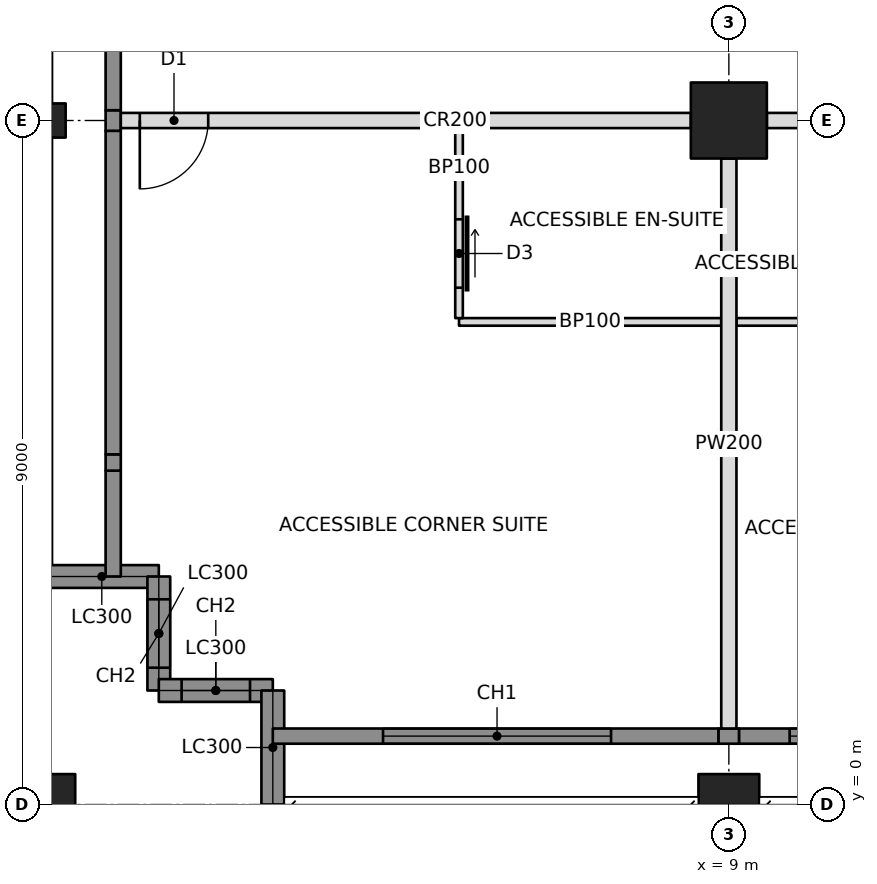
"""IFC4 building model, lengths in metres.
Left out: names, types, materials, properties, quantities, classifications, styles, units other than length and angle.
Written with IfcOpenShell. Run it as: python <this file> out.ifc"""

import sys

from ifc_helpers import new_model, si_unit, direction, frame, frame_2d, origin, origin_with_axes, origin_2d, place, context, subcontext, project, spatial, rectangle, hollow_rectangle, i_section, extrude, element, fill, save


model = new_model("IFC4")
c1 = context("Model", 3, precision=1e-05, world=origin(), true_north=direction((0.0, 1.0)))
c2 = subcontext(c1, "Body", "Model", "MODEL_VIEW")
j1 = project(units=[si_unit("LENGTHUNIT", "METRE"), si_unit("PLANEANGLEUNIT", "RADIAN")], contexts=[c1])
p1 = place(None, origin())
s1 = spatial("IfcSite", under=j1, at=p1, CompositionType="ELEMENT")
p2 = place(p1, origin())
s2 = spatial("IfcBuilding", under=s1, at=p2, CompositionType="ELEMENT")
p3 = place(p2, frame((0.0, 0.0, 97.6)))
s3 = spatial("IfcBuildingStorey", under=s2, at=p3, CompositionType="ELEMENT", Elevation=97.6)
p4 = place(p3, origin_with_axes())
e1 = element("IfcColumn", 1, at=p4, inside=s3, PredefinedType="COLUMN", context=c2, shape_type="SweptSolid", body=[
    extrude(hollow_rectangle(XDim=0.8, YDim=0.8, WallThickness=0.07, at=origin_2d()), origin(), (0.0, 0.0, 1.0), 3.4),
])
p5 = place(p3, frame((0.0, 9.0, 0.0), z_axis=(0.0, 0.0, 1.0), x_axis=(0.0, 1.0, 0.0)))
e2 = element("IfcColumn", 2, at=p5, inside=s3, PredefinedType="COLUMN", context=c2, shape_type="SweptSolid", body=[
    extrude(i_section(OverallWidth=0.449, OverallDepth=0.549, WebThickness=0.072, FlangeThickness=0.115, at=origin_2d()), origin(), (0.0, 0.0, 1.0), 3.4),
])
p6 = place(p3, frame((9.0, 0.0, 0.0), z_axis=(0.0, 0.0, 1.0), x_axis=(1.0, 0.0, 0.0)))
e3 = element("IfcColumn", 3, at=p6, inside=s3, PredefinedType="COLUMN", context=c2, shape_type="SweptSolid", body=[
    extrude(hollow_rectangle(XDim=0.8, YDim=0.8, WallThickness=0.07, at=origin_2d()), origin(), (0.0, 0.0, 1.0), 3.4),
])
p7 = place(p3, frame((9.0, 9.0, 0.0), z_axis=(0.0, 0.0, 1.0), x_axis=(1.0, 0.0, 0.0)))
e4 = element("IfcColumn", 4, at=p7, inside=s3, PredefinedType="COLUMN", context=c2, shape_type="SweptSolid", body=[
    extrude(hollow_rectangle(XDim=1.0, YDim=1.0, WallThickness=0.1, at=origin_2d()), origin(), (0.0, 0.0, 1.0), 3.4),
])
p8 = place(p3, frame((0.0, 3.0, 0.0), z_axis=(0.0, 0.0, 1.0), x_axis=(1.0, 0.0, 0.0)))
e5 = element("IfcWall", 5, at=p8, inside=s3, PredefinedType="SOLIDWALL", context=c2, shape_type="SweptSolid", body=[
    extrude(rectangle(XDim=1.5, YDim=0.3, at=frame_2d((0.75, 0.0))), origin(), (0.0, 0.0, 1.0), 2.42),
])
p9 = place(p3, frame((1.5, 3.0, 0.0), z_axis=(0.0, 0.0, 1.0), x_axis=(0.0, -1.0, 0.0)))
e6 = element("IfcWall", 6, at=p9, inside=s3, PredefinedType="SOLIDWALL", context=c2, shape_type="SweptSolid", body=[
    extrude(rectangle(XDim=1.5, YDim=0.3, at=frame_2d((0.75, 0.0))), origin(), (0.0, 0.0, 1.0), 3.2),
])
p10 = place(p9, frame((0.3, 0.0, 0.6)))
e7 = element("IfcOpeningElement", 7, at=p10, cuts=e6, PredefinedType="OPENING", context=c2, shape_type="SweptSolid", body=[
    extrude(rectangle(XDim=0.9, YDim=2.2, at=frame_2d((0.45, 1.1))), frame((0.0, 0.16, 0.0), z_axis=(0.0, -1.0, 0.0), x_axis=(1.0, 0.0, 0.0)), (0.0, 0.0, 1.0), 0.32),
])
p11 = place(p3, frame((1.5, 1.5, 0.0), z_axis=(0.0, 0.0, 1.0), x_axis=(1.0, 0.0, 0.0)))
e8 = element("IfcWall", 8, at=p11, inside=s3, PredefinedType="SOLIDWALL", context=c2, shape_type="SweptSolid", body=[
    extrude(rectangle(XDim=1.5, YDim=0.3, at=frame_2d((0.75, 0.0))), origin(), (0.0, 0.0, 1.0), 3.2),
])
p12 = place(p11, frame((0.3, 0.0, 0.6)))
e9 = element("IfcOpeningElement", 9, at=p12, cuts=e8, PredefinedType="OPENING", context=c2, shape_type="SweptSolid", body=[
    extrude(rectangle(XDim=0.9, YDim=2.2, at=frame_2d((0.45, 1.1))), frame((0.0, 0.16, 0.0), z_axis=(0.0, -1.0, 0.0), x_axis=(1.0, 0.0, 0.0)), (0.0, 0.0, 1.0), 0.32),
])
p13 = place(p3, frame((3.0, 1.5, 0.0), z_axis=(0.0, 0.0, 1.0), x_axis=(0.0, -1.0, 0.0)))
e10 = element("IfcWall", 10, at=p13, inside=s3, PredefinedType="SOLIDWALL", context=c2, shape_type="SweptSolid", body=[
    extrude(rectangle(XDim=1.5, YDim=0.3, at=frame_2d((0.75, 0.0))), origin(), (0.0, 0.0, 1.0), 2.42),
])
p14 = place(p3, frame((3.0, 0.9, 0.0), z_axis=(0.0, 0.0, 1.0), x_axis=(1.0, 0.0, 0.0)))
e11 = element("IfcWall", 11, at=p14, inside=s3, PredefinedType="SOLIDWALL", context=c2, shape_type="SweptSolid", body=[
    extrude(rectangle(XDim=5.865, YDim=0.2, at=frame_2d((2.932, 0.0))), origin(), (0.0, 0.0, 1.0), 3.2),
])
p15 = place(p14, frame((1.45, 0.0, 0.6)))
e12 = element("IfcOpeningElement", 12, at=p15, cuts=e11, PredefinedType="OPENING", context=c2, shape_type="SweptSolid", body=[
    extrude(rectangle(XDim=3.0, YDim=2.2, at=frame_2d((1.5, 1.1))), frame((0.0, 0.11, 0.0), z_axis=(0.0, -1.0, 0.0), x_axis=(1.0, 0.0, 0.0)), (0.0, 0.0, 1.0), 0.22),
])
p16 = place(p3, frame((0.9, 3.0, 0.0), z_axis=(0.0, 0.0, 1.0), x_axis=(0.0, 1.0, 0.0)))
e13 = element("IfcWall", 13, at=p16, inside=s3, PredefinedType="SOLIDWALL", context=c2, shape_type="SweptSolid", body=[
    extrude(rectangle(XDim=1.393, YDim=0.2, at=frame_2d((0.696, 0.0))), origin(), (0.0, 0.0, 1.0), 3.2),
])
p17 = place(p3, frame((1.0, 9.0, 0.0), z_axis=(0.0, 0.0, 1.0), x_axis=(1.0, 0.0, 0.0)))
e14 = element("IfcWall", 14, at=p17, inside=s3, PredefinedType="PARTITIONING", context=c2, shape_type="SweptSolid", body=[
    extrude(rectangle(XDim=7.5, YDim=0.2, at=frame_2d((3.75, 0.0))), origin(), (0.0, 0.0, 1.0), 2.438),
])
p18 = place(p17, frame((0.25, 0.0, 0.0)))
e15 = element("IfcOpeningElement", 15, at=p18, cuts=e14, PredefinedType="OPENING", context=c2, shape_type="SweptSolid", body=[
    extrude(rectangle(XDim=0.9, YDim=2.1, at=frame_2d((0.45, 1.05))), frame((0.0, 0.11, 0.0), z_axis=(0.0, -1.0, 0.0), x_axis=(1.0, 0.0, 0.0)), (0.0, 0.0, 1.0), 0.22),
])
p19 = place(p3, frame((9.5, 9.0, 0.0), z_axis=(0.0, 0.0, 1.0), x_axis=(1.0, 0.0, 0.0)))
e16 = element("IfcWall", 16, at=p19, inside=s3, PredefinedType="PARTITIONING", context=c2, shape_type="SweptSolid", body=[
    extrude(rectangle(XDim=8.0, YDim=0.2, at=frame_2d((4.0, 0.0))), origin(), (0.0, 0.0, 1.0), 2.405),
])
p20 = place(p19, frame((2.85, 0.0, 0.0)))
e17 = element("IfcOpeningElement", 17, at=p20, cuts=e16, PredefinedType="OPENING", context=c2, shape_type="SweptSolid", body=[
    extrude(rectangle(XDim=0.9, YDim=2.1, at=frame_2d((0.45, 1.05))), frame((0.0, 0.11, 0.0), z_axis=(0.0, -1.0, 0.0), x_axis=(1.0, 0.0, 0.0)), (0.0, 0.0, 1.0), 0.22),
])
p21 = place(p19, frame((4.25, 0.0, 0.0)))
e18 = element("IfcOpeningElement", 18, at=p21, cuts=e16, PredefinedType="OPENING", context=c2, shape_type="SweptSolid", body=[
    extrude(rectangle(XDim=0.9, YDim=2.1, at=frame_2d((0.45, 1.05))), frame((0.0, 0.11, 0.0), z_axis=(0.0, -1.0, 0.0), x_axis=(1.0, 0.0, 0.0)), (0.0, 0.0, 1.0), 0.22),
])
p22 = place(p3, frame((9.0, 8.5, 0.0), z_axis=(0.0, 0.0, 1.0), x_axis=(0.0, -1.0, 0.0)))
e19 = element("IfcWall", 19, at=p22, inside=s3, PredefinedType="PARTITIONING", context=c2, shape_type="SweptSolid", body=[
    extrude(rectangle(XDim=7.5, YDim=0.2, at=frame_2d((3.75, 0.0))), origin(), (0.0, 0.0, 1.0), 2.438),
])
p23 = place(p3, frame((5.45, 6.35, 0.0), z_axis=(0.0, 0.0, 1.0), x_axis=(1.0, 0.0, 0.0)))
e20 = element("IfcWall", 20, at=p23, inside=s3, PredefinedType="PARTITIONING", context=c2, shape_type="SweptSolid", body=[
    extrude(rectangle(XDim=3.45, YDim=0.1, at=frame_2d((1.725, 0.0))), origin(), (0.0, 0.0, 1.0), 2.438),
])
p24 = place(p3, frame((5.45, 8.9, 0.0), z_axis=(0.0, 0.0, 1.0), x_axis=(0.0, -1.0, 0.0)))
e21 = element("IfcWall", 21, at=p24, inside=s3, PredefinedType="PARTITIONING", context=c2, shape_type="SweptSolid", body=[
    extrude(rectangle(XDim=2.5, YDim=0.1, at=frame_2d((1.25, 0.0))), origin(), (0.0, 0.0, 1.0), 2.438),
])
p25 = place(p24, frame((1.2, 0.0, 0.0)))
e22 = element("IfcOpeningElement", 22, at=p25, cuts=e21, PredefinedType="OPENING", context=c2, shape_type="SweptSolid", body=[
    extrude(rectangle(XDim=0.9, YDim=2.1, at=frame_2d((0.45, 1.05))), frame((0.0, 0.06, 0.0), z_axis=(0.0, -1.0, 0.0), x_axis=(1.0, 0.0, 0.0)), (0.0, 0.0, 1.0), 0.12),
])
p26 = place(p3, frame((9.1, 6.35, 0.0), z_axis=(0.0, 0.0, 1.0), x_axis=(1.0, 0.0, 0.0)))
e23 = element("IfcWall", 23, at=p26, inside=s3, PredefinedType="PARTITIONING", context=c2, shape_type="SweptSolid", body=[
    extrude(rectangle(XDim=2.95, YDim=0.1, at=frame_2d((1.475, 0.0))), origin(), (0.0, 0.0, 1.0), 2.438),
])
p27 = place(p3, frame((8.865, 0.9, 0.0), z_axis=(0.0, 0.0, 1.0), x_axis=(1.0, 0.0, 0.0)))
e24 = element("IfcWall", 24, at=p27, inside=s3, PredefinedType="SOLIDWALL", context=c2, shape_type="SweptSolid", body=[
    extrude(rectangle(XDim=0.271, YDim=0.2, at=frame_2d((0.135, 0.0))), origin(), (0.0, 0.0, 1.0), 2.438),
])
p28 = place(p3, frame((9.135, 0.9, 0.0), z_axis=(0.0, 0.0, 1.0), x_axis=(1.0, 0.0, 0.0)))
e25 = element("IfcWall", 25, at=p28, inside=s3, PredefinedType="SOLIDWALL", context=c2, shape_type="SweptSolid", body=[
    extrude(rectangle(XDim=8.671, YDim=0.2, at=frame_2d((4.335, 0.0))), origin(), (0.0, 0.0, 1.0), 3.2),
])
p29 = place(p28, frame((0.665, 0.0, 0.6)))
e26 = element("IfcOpeningElement", 26, at=p29, cuts=e25, PredefinedType="OPENING", context=c2, shape_type="SweptSolid", body=[
    extrude(rectangle(XDim=3.0, YDim=2.2, at=frame_2d((1.5, 1.1))), frame((0.0, 0.11, 0.0), z_axis=(0.0, -1.0, 0.0), x_axis=(1.0, 0.0, 0.0)), (0.0, 0.0, 1.0), 0.22),
])
p30 = place(p28, frame((5.065, 0.0, 0.6)))
e27 = element("IfcOpeningElement", 27, at=p30, cuts=e25, PredefinedType="OPENING", context=c2, shape_type="SweptSolid", body=[
    extrude(rectangle(XDim=3.0, YDim=2.2, at=frame_2d((1.5, 1.1))), frame((0.0, 0.11, 0.0), z_axis=(0.0, -1.0, 0.0), x_axis=(1.0, 0.0, 0.0)), (0.0, 0.0, 1.0), 0.22),
])
p31 = place(p3, frame((0.9, 4.393, 0.0), z_axis=(0.0, 0.0, 1.0), x_axis=(0.0, 1.0, 0.0)))
e28 = element("IfcWall", 28, at=p31, inside=s3, PredefinedType="SOLIDWALL", context=c2, shape_type="SweptSolid", body=[
    extrude(rectangle(XDim=0.215, YDim=0.2, at=frame_2d((0.107, 0.0))), origin(), (0.0, 0.0, 1.0), 2.661),
])
p32 = place(p3, frame((0.9, 4.607, 0.0), z_axis=(0.0, 0.0, 1.0), x_axis=(0.0, 1.0, 0.0)))
e29 = element("IfcWall", 29, at=p32, inside=s3, PredefinedType="SOLIDWALL", context=c2, shape_type="SweptSolid", body=[
    extrude(rectangle(XDim=4.257, YDim=0.2, at=frame_2d((2.129, 0.0))), origin(), (0.0, 0.0, 1.0), 3.2),
])
p33 = place(p3, frame((0.9, 8.865, 0.0), z_axis=(0.0, 0.0, 1.0), x_axis=(0.0, 1.0, 0.0)))
e30 = element("IfcWall", 30, at=p33, inside=s3, PredefinedType="SOLIDWALL", context=c2, shape_type="SweptSolid", body=[
    extrude(rectangle(XDim=0.271, YDim=0.2, at=frame_2d((0.135, 0.0))), origin(), (0.0, 0.0, 1.0), 2.438),
])
p34 = place(p3, frame((0.9, 9.135, 0.0), z_axis=(0.0, 0.0, 1.0), x_axis=(0.0, 1.0, 0.0)))
e31 = element("IfcWall", 31, at=p34, inside=s3, PredefinedType="SOLIDWALL", context=c2, shape_type="SweptSolid", body=[
    extrude(rectangle(XDim=8.671, YDim=0.2, at=frame_2d((4.335, 0.0))), origin(), (0.0, 0.0, 1.0), 3.2),
])
p35 = place(p34, frame((2.015, 0.0, 0.6)))
e32 = element("IfcOpeningElement", 32, at=p35, cuts=e31, PredefinedType="OPENING", context=c2, shape_type="SweptSolid", body=[
    extrude(rectangle(XDim=3.0, YDim=2.2, at=frame_2d((1.5, 1.1))), frame((0.0, 0.11, 0.0), z_axis=(0.0, -1.0, 0.0), x_axis=(1.0, 0.0, 0.0)), (0.0, 0.0, 1.0), 0.22),
])
p36 = place(p34, frame((5.515, 0.0, 0.6)))
e33 = element("IfcOpeningElement", 33, at=p36, cuts=e31, PredefinedType="OPENING", context=c2, shape_type="SweptSolid", body=[
    extrude(rectangle(XDim=3.0, YDim=2.2, at=frame_2d((1.5, 1.1))), frame((0.0, 0.11, 0.0), z_axis=(0.0, -1.0, 0.0), x_axis=(1.0, 0.0, 0.0)), (0.0, 0.0, 1.0), 0.22),
])
p37 = place(p10, origin())
e34 = element("IfcWindow", 34, at=p37, inside=s3, PartitioningType="SINGLE_PANEL", PredefinedType="WINDOW", context=c2, shape_type="SweptSolid", body=[
    extrude(rectangle(XDim=0.9, YDim=2.2, at=frame_2d((0.45, 1.1))), frame((0.0, 0.03, 0.0), z_axis=(0.0, -1.0, 0.0), x_axis=(1.0, 0.0, 0.0)), (0.0, 0.0, 1.0), 0.06),
])
fill(e7, e34)
p38 = place(p12, origin())
e35 = element("IfcWindow", 35, at=p38, inside=s3, PartitioningType="SINGLE_PANEL", PredefinedType="WINDOW", context=c2, shape_type="SweptSolid", body=[
    extrude(rectangle(XDim=0.9, YDim=2.2, at=frame_2d((0.45, 1.1))), frame((0.0, 0.03, 0.0), z_axis=(0.0, -1.0, 0.0), x_axis=(1.0, 0.0, 0.0)), (0.0, 0.0, 1.0), 0.06),
])
fill(e9, e35)
p39 = place(p15, origin())
e36 = element("IfcWindow", 36, at=p39, inside=s3, PartitioningType="TRIPLE_PANEL_VERTICAL", PredefinedType="WINDOW", context=c2, shape_type="SweptSolid", body=[
    extrude(rectangle(XDim=3.0, YDim=2.2, at=frame_2d((1.5, 1.1))), frame((0.0, 0.03, 0.0), z_axis=(0.0, -1.0, 0.0), x_axis=(1.0, 0.0, 0.0)), (0.0, 0.0, 1.0), 0.06),
])
fill(e12, e36)
p40 = place(p29, origin())
e37 = element("IfcWindow", 37, at=p40, inside=s3, PartitioningType="TRIPLE_PANEL_VERTICAL", PredefinedType="WINDOW", context=c2, shape_type="SweptSolid", body=[
    extrude(rectangle(XDim=3.0, YDim=2.2, at=frame_2d((1.5, 1.1))), frame((0.0, 0.03, 0.0), z_axis=(0.0, -1.0, 0.0), x_axis=(1.0, 0.0, 0.0)), (0.0, 0.0, 1.0), 0.06),
])
fill(e26, e37)
p41 = place(p25, origin())
e38 = element("IfcDoor", 38, at=p41, inside=s3, OperationType="SLIDING_TO_LEFT", PredefinedType="DOOR", context=c2, shape_type="SweptSolid", body=[
    extrude(rectangle(XDim=0.9, YDim=2.1, at=frame_2d((0.45, 1.05))), frame((0.0, 0.025, 0.0), z_axis=(0.0, -1.0, 0.0), x_axis=(1.0, 0.0, 0.0)), (0.0, 0.0, 1.0), 0.05),
])
fill(e22, e38)
p42 = place(p18, frame((0.9, 0.0, 0.0), z_axis=(0.0, 0.0, 1.0), x_axis=(-1.0, 0.0, 0.0)))
e39 = element("IfcDoor", 39, at=p42, inside=s3, OperationType="SINGLE_SWING_RIGHT", PredefinedType="DOOR", context=c2, shape_type="SweptSolid", body=[
    extrude(rectangle(XDim=0.9, YDim=2.1, at=frame_2d((0.45, 1.05))), frame((0.0, 0.025, 0.0), z_axis=(0.0, -1.0, 0.0), x_axis=(1.0, 0.0, 0.0)), (0.0, 0.0, 1.0), 0.05),
])
fill(e15, e39)
save(model, sys.argv[1])
